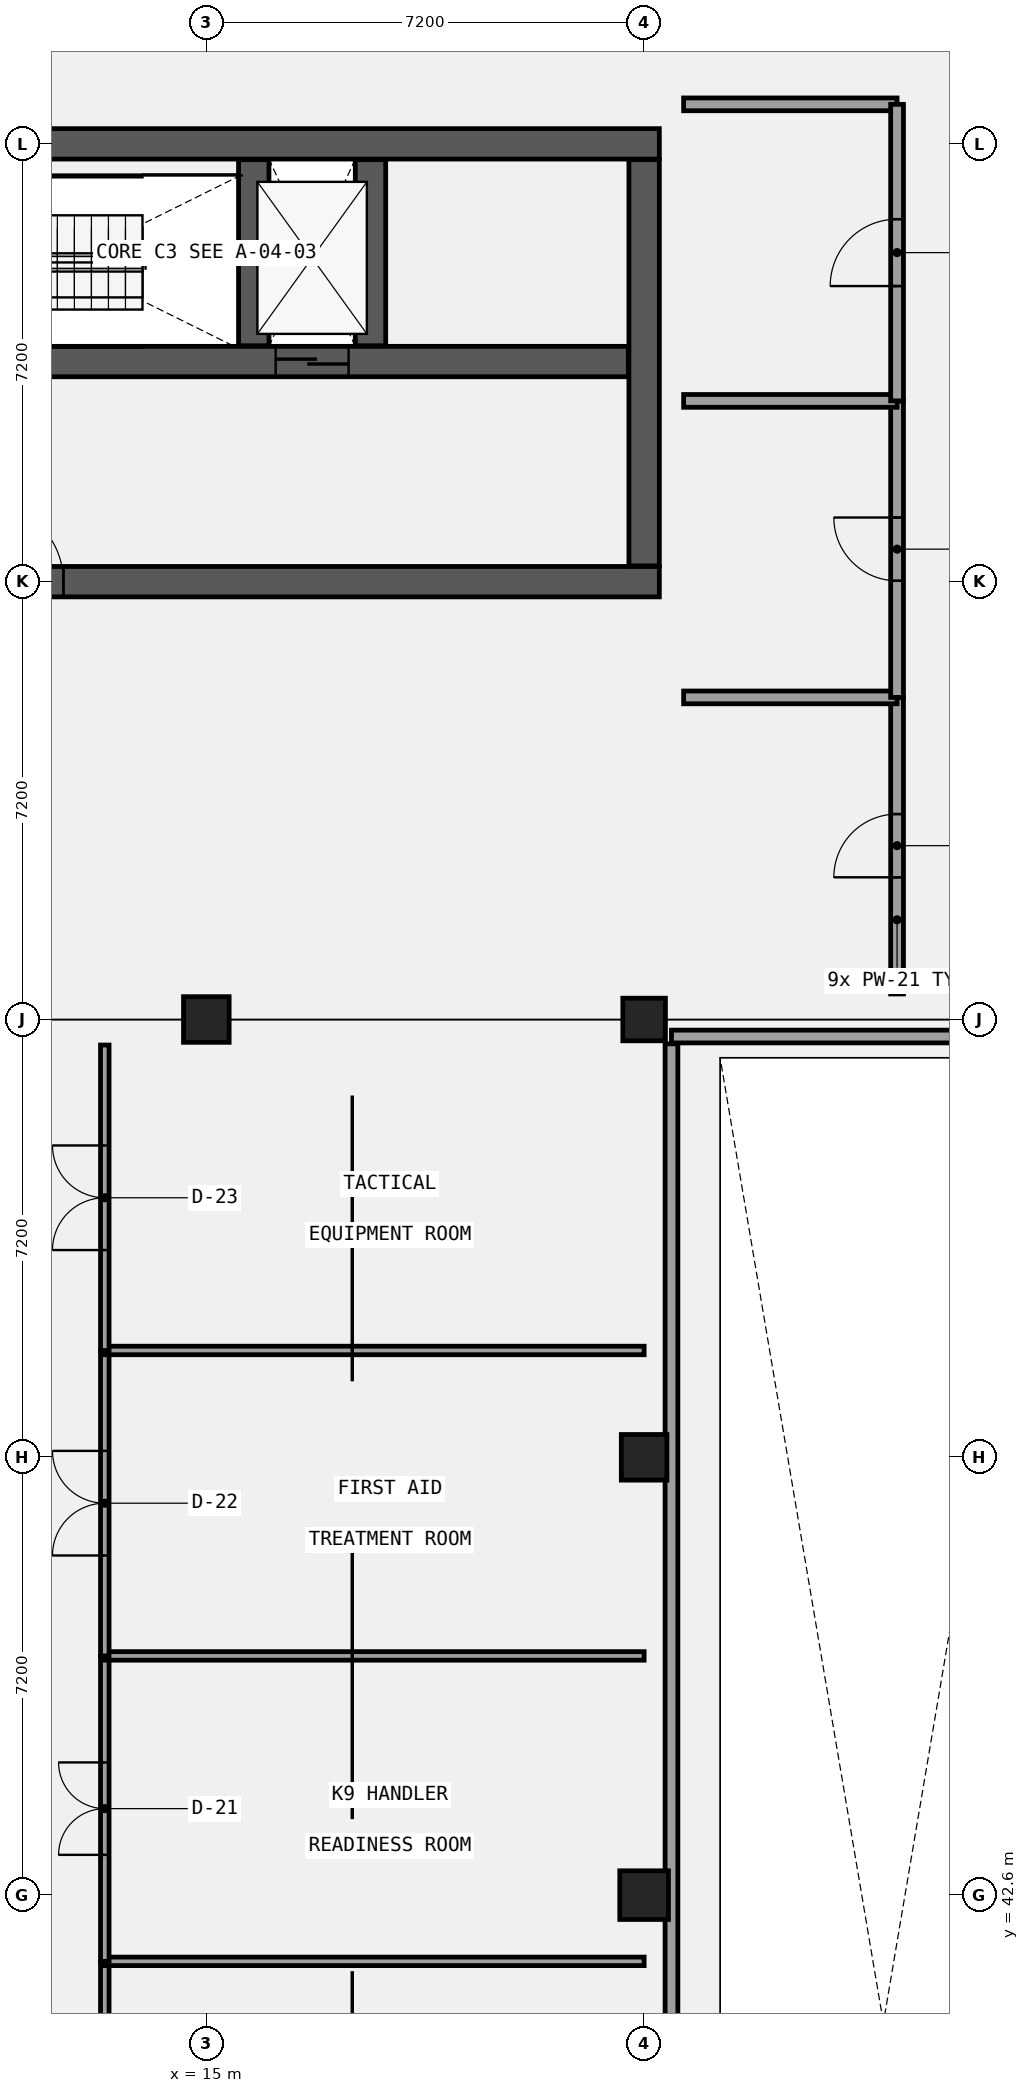
"""IFC4 building model, lengths in metres.
Left out: names, types, materials, properties, quantities, classifications, styles, units other than length and angle.
Written with IfcOpenShell. Run it as: python <this file> out.ifc"""

import sys

from ifc_helpers import new_model, si_unit, direction, frame, frame_2d, origin, origin_2d, place, context, subcontext, project, spatial, rectangle, extrude, element, fill, save


model = new_model("IFC4")
c1 = context("Model", 3, precision=1e-05, world=origin(), true_north=direction((0.0, 1.0)))
c2 = subcontext(c1, "Body", "Model", "MODEL_VIEW")
j1 = project(units=[si_unit("LENGTHUNIT", "METRE"), si_unit("PLANEANGLEUNIT", "RADIAN")], contexts=[c1])
p1 = place(None, origin())
s1 = spatial("IfcSite", under=j1, at=p1, CompositionType="ELEMENT")
p2 = place(p1, origin())
s2 = spatial("IfcBuilding", under=s1, at=p2, CompositionType="ELEMENT")
p3 = place(p2, origin())
s3 = spatial("IfcBuildingStorey", under=s2, at=p3, CompositionType="ELEMENT", Elevation=0.0)
p4 = place(p3, frame((7.55, 71.4, 0.0), z_axis=(0.0, 0.0, 1.0), x_axis=(1.0, 0.0, 0.0)))
e1 = element("IfcWall", 1, at=p4, inside=s3, PredefinedType="SHEAR", context=c2, shape_type="SweptSolid", body=[
    extrude(rectangle(XDim=14.9, YDim=0.5, at=frame_2d((7.45, 0.0))), origin(), (0.0, 0.0, 1.0), 5.4),
])
p5 = place(p3, frame((7.55, 64.2, 0.0), z_axis=(0.0, 0.0, 1.0), x_axis=(1.0, 0.0, 0.0)))
e2 = element("IfcWall", 2, at=p5, inside=s3, PredefinedType="SHEAR", context=c2, shape_type="SweptSolid", body=[
    extrude(rectangle(XDim=14.9, YDim=0.5, at=frame_2d((7.45, 0.0))), origin(), (0.0, 0.0, 1.0), 5.4),
])
p6 = place(p5, frame((3.8, 0.0, 0.0)))
e3 = element("IfcOpeningElement", 3, at=p6, cuts=e2, PredefinedType="OPENING", context=c2, shape_type="SweptSolid", body=[
    extrude(rectangle(XDim=1.3, YDim=2.2, at=frame_2d((0.65, 1.1))), frame((0.0, 0.26, 0.0), z_axis=(0.0, -1.0, 0.0), x_axis=(1.0, 0.0, 0.0)), (0.0, 0.0, 1.0), 0.52),
])
p7 = place(p3, frame((22.2, 64.46, 0.0), z_axis=(0.0, 0.0, 1.0), x_axis=(0.0, 1.0, 0.0)))
e4 = element("IfcWall", 4, at=p7, inside=s3, PredefinedType="SHEAR", context=c2, shape_type="SweptSolid", body=[
    extrude(rectangle(XDim=6.68, YDim=0.5, at=frame_2d((3.34, 0.0))), origin(), (0.0, 0.0, 1.0), 5.4),
])
p8 = place(p3, frame((8.06, 67.82, 0.0), z_axis=(0.0, 0.0, 1.0), x_axis=(1.0, 0.0, 0.0)))
e5 = element("IfcWall", 5, at=p8, inside=s3, PredefinedType="SHEAR", context=c2, shape_type="SweptSolid", body=[
    extrude(rectangle(XDim=13.88, YDim=0.5, at=frame_2d((6.94, 0.0))), origin(), (0.0, 0.0, 1.0), 5.4),
])
p9 = place(p8, frame((8.08, 0.0, 0.0)))
e6 = element("IfcOpeningElement", 6, at=p9, cuts=e5, PredefinedType="OPENING", context=c2, shape_type="SweptSolid", body=[
    extrude(rectangle(XDim=1.2, YDim=2.15, at=frame_2d((0.6, 1.075))), frame((0.0, 0.26, 0.0), z_axis=(0.0, -1.0, 0.0), x_axis=(1.0, 0.0, 0.0)), (0.0, 0.0, 1.0), 0.52),
])
p10 = place(p8, frame((0.315, 0.0, 0.0)))
e7 = element("IfcOpeningElement", 7, at=p10, cuts=e5, PredefinedType="OPENING", context=c2, shape_type="SweptSolid", body=[
    extrude(rectangle(XDim=1.15, YDim=2.15, at=frame_2d((0.575, 1.075))), frame((0.0, 0.26, 0.0), z_axis=(0.0, -1.0, 0.0), x_axis=(1.0, 0.0, 0.0)), (0.0, 0.0, 1.0), 0.52),
])
for number, where, z_axis, x_axis in (
    (8, (15.78, 68.08, 0.0), (0.0, 0.0, 1.0), (0.0, 1.0, 0.0)),
    (9, (17.7, 68.08, 0.0), (0.0, 0.0, 1.0), (0.0, 1.0, 0.0)),
):
    element("IfcWall", number, at=place(p3, frame(where, z_axis=z_axis, x_axis=x_axis)), inside=s3, PredefinedType="SHEAR", context=c2, shape_type="SweptSolid", body=[
        extrude(rectangle(XDim=3.06, YDim=0.5, at=frame_2d((1.53, 0.0))), origin(), (0.0, 0.0, 1.0), 5.4),
    ])
p11 = place(p3, frame((15.0, 57.0, 0.0), z_axis=(0.0, 0.0, 1.0), x_axis=(1.0, 0.0, 0.0)))
e10 = element("IfcColumn", 10, at=p11, inside=s3, PredefinedType="COLUMN", context=c2, shape_type="SweptSolid", body=[
    extrude(rectangle(XDim=0.75, YDim=0.75, at=origin_2d()), origin(), (0.0, 0.0, 1.0), 5.4),
])
p12 = place(p3, frame((22.2, 42.6, 0.0), z_axis=(0.0, 0.0, 1.0), x_axis=(1.0, 0.0, 0.0)))
e11 = element("IfcColumn", 11, at=p12, inside=s3, PredefinedType="COLUMN", context=c2, shape_type="SweptSolid", body=[
    extrude(rectangle(XDim=0.8, YDim=0.8, at=origin_2d()), origin(), (0.0, 0.0, 1.0), 5.4),
])
p13 = place(p3, frame((22.2, 49.8, 0.0), z_axis=(0.0, 0.0, 1.0), x_axis=(1.0, 0.0, 0.0)))
e12 = element("IfcColumn", 12, at=p13, inside=s3, PredefinedType="COLUMN", context=c2, shape_type="SweptSolid", body=[
    extrude(rectangle(XDim=0.75, YDim=0.75, at=origin_2d()), origin(), (0.0, 0.0, 1.0), 5.4),
])
p14 = place(p3, frame((22.2, 57.0, 0.0), z_axis=(0.0, 0.0, 1.0), x_axis=(1.0, 0.0, 0.0)))
e13 = element("IfcColumn", 13, at=p14, inside=s3, PredefinedType="COLUMN", context=c2, shape_type="SweptSolid", body=[
    extrude(rectangle(XDim=0.7, YDim=0.7, at=origin_2d()), origin(), (0.0, 0.0, 1.0), 5.4),
])
p15 = place(p3, frame((22.65, 24.6, 0.0), z_axis=(0.0, 0.0, 1.0), x_axis=(0.0, 1.0, 0.0)))
e14 = element("IfcWall", 14, at=p15, inside=s3, PredefinedType="PARTITIONING", context=c2, shape_type="SweptSolid", body=[
    extrude(rectangle(XDim=32.0, YDim=0.21, at=frame_2d((16.0, 0.0))), origin(), (0.0, 0.0, 1.0), 4.65),
])
p16 = place(p3, frame((22.65, 56.72, 0.0), z_axis=(0.0, 0.0, 1.0), x_axis=(1.0, 0.0, 0.0)))
e15 = element("IfcWall", 15, at=p16, inside=s3, PredefinedType="PARTITIONING", context=c2, shape_type="SweptSolid", body=[
    extrude(rectangle(XDim=6.2, YDim=0.21, at=frame_2d((3.1, 0.0))), origin(), (0.0, 0.0, 1.0), 4.42),
])
p17 = place(p3, frame((13.33, 36.489, 0.0), z_axis=(0.0, 0.0, 1.0), x_axis=(0.0, 1.0, 0.0)))
e16 = element("IfcWall", 16, at=p17, inside=s3, PredefinedType="PARTITIONING", context=c2, shape_type="SweptSolid", body=[
    extrude(rectangle(XDim=5.022, YDim=0.14, at=frame_2d((2.511, 0.0))), origin(), (0.0, 0.0, 1.0), 5.12),
])
p18 = place(p17, frame((1.751, 0.0, 0.0)))
e17 = element("IfcOpeningElement", 17, at=p18, cuts=e16, PredefinedType="OPENING", context=c2, shape_type="SweptSolid", body=[
    extrude(rectangle(XDim=1.52, YDim=2.22, at=frame_2d((0.76, 1.11))), frame((0.0, 0.08, 0.0), z_axis=(0.0, -1.0, 0.0), x_axis=(1.0, 0.0, 0.0)), (0.0, 0.0, 1.0), 0.16),
])
p19 = place(p3, frame((13.33, 41.511, 0.0), z_axis=(0.0, 0.0, 1.0), x_axis=(1.0, 0.0, 0.0)))
e18 = element("IfcWall", 18, at=p19, inside=s3, PredefinedType="PARTITIONING", context=c2, shape_type="SweptSolid", body=[
    extrude(rectangle(XDim=8.87, YDim=0.14, at=frame_2d((4.435, 0.0))), origin(), (0.0, 0.0, 1.0), 5.12),
])
p20 = place(p3, frame((13.33, 41.511, 0.0), z_axis=(0.0, 0.0, 1.0), x_axis=(0.0, 1.0, 0.0)))
e19 = element("IfcWall", 19, at=p20, inside=s3, PredefinedType="PARTITIONING", context=c2, shape_type="SweptSolid", body=[
    extrude(rectangle(XDim=5.023, YDim=0.14, at=frame_2d((2.511, 0.0))), origin(), (0.0, 0.0, 1.0), 5.12),
])
p21 = place(p20, frame((1.751, 0.0, 0.0)))
e20 = element("IfcOpeningElement", 20, at=p21, cuts=e19, PredefinedType="OPENING", context=c2, shape_type="SweptSolid", body=[
    extrude(rectangle(XDim=1.52, YDim=2.35, at=frame_2d((0.76, 1.175))), frame((0.0, 0.08, 0.0), z_axis=(0.0, -1.0, 0.0), x_axis=(1.0, 0.0, 0.0)), (0.0, 0.0, 1.0), 0.16),
])
p22 = place(p3, frame((13.33, 46.534, 0.0), z_axis=(0.0, 0.0, 1.0), x_axis=(1.0, 0.0, 0.0)))
e21 = element("IfcWall", 21, at=p22, inside=s3, PredefinedType="PARTITIONING", context=c2, shape_type="SweptSolid", body=[
    extrude(rectangle(XDim=8.87, YDim=0.14, at=frame_2d((4.435, 0.0))), origin(), (0.0, 0.0, 1.0), 5.12),
])
p23 = place(p3, frame((13.33, 46.534, 0.0), z_axis=(0.0, 0.0, 1.0), x_axis=(0.0, 1.0, 0.0)))
e22 = element("IfcWall", 22, at=p23, inside=s3, PredefinedType="PARTITIONING", context=c2, shape_type="SweptSolid", body=[
    extrude(rectangle(XDim=5.023, YDim=0.14, at=frame_2d((2.511, 0.0))), origin(), (0.0, 0.0, 1.0), 5.12),
])
p24 = place(p23, frame((1.652, 0.0, 0.0)))
e23 = element("IfcOpeningElement", 23, at=p24, cuts=e22, PredefinedType="OPENING", context=c2, shape_type="SweptSolid", body=[
    extrude(rectangle(XDim=1.72, YDim=2.1, at=frame_2d((0.86, 1.05))), frame((0.0, 0.08, 0.0), z_axis=(0.0, -1.0, 0.0), x_axis=(1.0, 0.0, 0.0)), (0.0, 0.0, 1.0), 0.16),
])
p25 = place(p3, frame((13.33, 51.557, 0.0), z_axis=(0.0, 0.0, 1.0), x_axis=(1.0, 0.0, 0.0)))
e24 = element("IfcWall", 24, at=p25, inside=s3, PredefinedType="PARTITIONING", context=c2, shape_type="SweptSolid", body=[
    extrude(rectangle(XDim=8.87, YDim=0.14, at=frame_2d((4.435, 0.0))), origin(), (0.0, 0.0, 1.0), 5.12),
])
p26 = place(p3, frame((13.33, 51.557, 0.0), z_axis=(0.0, 0.0, 1.0), x_axis=(0.0, 1.0, 0.0)))
e25 = element("IfcWall", 25, at=p26, inside=s3, PredefinedType="PARTITIONING", context=c2, shape_type="SweptSolid", body=[
    extrude(rectangle(XDim=5.023, YDim=0.14, at=frame_2d((2.512, 0.0))), origin(), (0.0, 0.0, 1.0), 5.12),
])
p27 = place(p26, frame((1.652, 0.0, 0.0)))
e26 = element("IfcOpeningElement", 26, at=p27, cuts=e25, PredefinedType="OPENING", context=c2, shape_type="SweptSolid", body=[
    extrude(rectangle(XDim=1.72, YDim=2.22, at=frame_2d((0.86, 1.11))), frame((0.0, 0.08, 0.0), z_axis=(0.0, -1.0, 0.0), x_axis=(1.0, 0.0, 0.0)), (0.0, 0.0, 1.0), 0.16),
])
p28 = place(p3, frame((22.85, 72.05, 0.0), z_axis=(0.0, 0.0, 1.0), x_axis=(1.0, 0.0, 0.0)))
e27 = element("IfcWall", 27, at=p28, inside=s3, PredefinedType="PARTITIONING", context=c2, shape_type="SweptSolid", body=[
    extrude(rectangle(XDim=3.51, YDim=0.21, at=frame_2d((1.755, 0.0))), origin(), (0.0, 0.0, 1.0), 5.12),
])
p29 = place(p3, frame((26.36, 57.42, 0.0), z_axis=(0.0, 0.0, 1.0), x_axis=(0.0, 1.0, 0.0)))
e28 = element("IfcWall", 28, at=p29, inside=s3, PredefinedType="PARTITIONING", context=c2, shape_type="SweptSolid", body=[
    extrude(rectangle(XDim=4.877, YDim=0.21, at=frame_2d((2.438, 0.0))), origin(), (0.0, 0.0, 1.0), 5.12),
])
p30 = place(p29, frame((1.918, 0.0, 0.0)))
e29 = element("IfcOpeningElement", 29, at=p30, cuts=e28, PredefinedType="OPENING", context=c2, shape_type="SweptSolid", body=[
    extrude(rectangle(XDim=1.04, YDim=2.22, at=frame_2d((0.52, 1.11))), frame((0.0, 0.115, 0.0), z_axis=(0.0, -1.0, 0.0), x_axis=(1.0, 0.0, 0.0)), (0.0, 0.0, 1.0), 0.23),
])
p31 = place(p3, frame((22.85, 62.297, 0.0), z_axis=(0.0, 0.0, 1.0), x_axis=(1.0, 0.0, 0.0)))
e30 = element("IfcWall", 30, at=p31, inside=s3, PredefinedType="PARTITIONING", context=c2, shape_type="SweptSolid", body=[
    extrude(rectangle(XDim=3.51, YDim=0.21, at=frame_2d((1.755, 0.0))), origin(), (0.0, 0.0, 1.0), 4.57),
])
p32 = place(p3, frame((26.36, 62.297, 0.0), z_axis=(0.0, 0.0, 1.0), x_axis=(0.0, 1.0, 0.0)))
e31 = element("IfcWall", 31, at=p32, inside=s3, PredefinedType="PARTITIONING", context=c2, shape_type="SweptSolid", body=[
    extrude(rectangle(XDim=4.876, YDim=0.21, at=frame_2d((2.438, 0.0))), origin(), (0.0, 0.0, 1.0), 5.12),
])
p33 = place(p32, frame((1.918, 0.0, 0.0)))
e32 = element("IfcOpeningElement", 32, at=p33, cuts=e31, PredefinedType="OPENING", context=c2, shape_type="SweptSolid", body=[
    extrude(rectangle(XDim=1.04, YDim=2.35, at=frame_2d((0.52, 1.175))), frame((0.0, 0.115, 0.0), z_axis=(0.0, -1.0, 0.0), x_axis=(1.0, 0.0, 0.0)), (0.0, 0.0, 1.0), 0.23),
])
p34 = place(p3, frame((22.85, 67.173, 0.0), z_axis=(0.0, 0.0, 1.0), x_axis=(1.0, 0.0, 0.0)))
e33 = element("IfcWall", 33, at=p34, inside=s3, PredefinedType="PARTITIONING", context=c2, shape_type="SweptSolid", body=[
    extrude(rectangle(XDim=3.51, YDim=0.21, at=frame_2d((1.755, 0.0))), origin(), (0.0, 0.0, 1.0), 5.12),
])
p35 = place(p3, frame((26.36, 67.173, 0.0), z_axis=(0.0, 0.0, 1.0), x_axis=(0.0, 1.0, 0.0)))
e34 = element("IfcWall", 34, at=p35, inside=s3, PredefinedType="PARTITIONING", context=c2, shape_type="SweptSolid", body=[
    extrude(rectangle(XDim=4.877, YDim=0.21, at=frame_2d((2.438, 0.0))), origin(), (0.0, 0.0, 1.0), 5.12),
])
p36 = place(p35, frame((1.888, 0.0, 0.0)))
e35 = element("IfcOpeningElement", 35, at=p36, cuts=e34, PredefinedType="OPENING", context=c2, shape_type="SweptSolid", body=[
    extrude(rectangle(XDim=1.1, YDim=2.1, at=frame_2d((0.55, 1.05))), frame((0.0, 0.115, 0.0), z_axis=(0.0, -1.0, 0.0), x_axis=(1.0, 0.0, 0.0)), (0.0, 0.0, 1.0), 0.23),
])
p37 = place(p9, frame((1.2, 0.0, 0.0), z_axis=(0.0, 0.0, 1.0), x_axis=(-1.0, 0.0, 0.0)))
e36 = element("IfcDoor", 36, at=p37, inside=s3, OperationType="DOUBLE_DOOR_SLIDING", PredefinedType="DOOR", context=c2, shape_type="SweptSolid", body=[
    extrude(rectangle(XDim=1.2, YDim=2.15, at=frame_2d((0.6, 1.075))), frame((0.0, 0.025, 0.0), z_axis=(0.0, -1.0, 0.0), x_axis=(1.0, 0.0, 0.0)), (0.0, 0.0, 1.0), 0.05),
])
fill(e6, e36)
p38 = place(p6, frame((1.3, 0.0, 0.0), z_axis=(0.0, 0.0, 1.0), x_axis=(-1.0, 0.0, 0.0)))
e37 = element("IfcDoor", 37, at=p38, inside=s3, OperationType="SINGLE_SWING_LEFT", PredefinedType="DOOR", context=c2, shape_type="SweptSolid", body=[
    extrude(rectangle(XDim=1.3, YDim=2.2, at=frame_2d((0.65, 1.1))), frame((0.0, 0.025, 0.0), z_axis=(0.0, -1.0, 0.0), x_axis=(1.0, 0.0, 0.0)), (0.0, 0.0, 1.0), 0.05),
])
fill(e3, e37)
p39 = place(p21, origin())
e38 = element("IfcDoor", 38, at=p39, inside=s3, OperationType="DOUBLE_DOOR_SINGLE_SWING", PredefinedType="DOOR", context=c2, shape_type="SweptSolid", body=[
    extrude(rectangle(XDim=1.52, YDim=2.35, at=frame_2d((0.76, 1.175))), frame((0.0, 0.025, 0.0), z_axis=(0.0, -1.0, 0.0), x_axis=(1.0, 0.0, 0.0)), (0.0, 0.0, 1.0), 0.05),
])
fill(e20, e38)
p40 = place(p24, origin())
e39 = element("IfcDoor", 39, at=p40, inside=s3, OperationType="DOUBLE_DOOR_SINGLE_SWING", PredefinedType="DOOR", context=c2, shape_type="SweptSolid", body=[
    extrude(rectangle(XDim=1.72, YDim=2.1, at=frame_2d((0.86, 1.05))), frame((0.0, 0.025, 0.0), z_axis=(0.0, -1.0, 0.0), x_axis=(1.0, 0.0, 0.0)), (0.0, 0.0, 1.0), 0.05),
])
fill(e23, e39)
p41 = place(p27, origin())
e40 = element("IfcDoor", 40, at=p41, inside=s3, OperationType="DOUBLE_DOOR_SINGLE_SWING", PredefinedType="DOOR", context=c2, shape_type="SweptSolid", body=[
    extrude(rectangle(XDim=1.72, YDim=2.22, at=frame_2d((0.86, 1.11))), frame((0.0, 0.025, 0.0), z_axis=(0.0, -1.0, 0.0), x_axis=(1.0, 0.0, 0.0)), (0.0, 0.0, 1.0), 0.05),
])
fill(e26, e40)
p42 = place(p30, frame((1.04, 0.0, 0.0), z_axis=(0.0, 0.0, 1.0), x_axis=(-1.0, 0.0, 0.0)))
e41 = element("IfcDoor", 41, at=p42, inside=s3, OperationType="SINGLE_SWING_LEFT", PredefinedType="DOOR", context=c2, shape_type="SweptSolid", body=[
    extrude(rectangle(XDim=1.04, YDim=2.22, at=frame_2d((0.52, 1.11))), frame((0.0, 0.025, 0.0), z_axis=(0.0, -1.0, 0.0), x_axis=(1.0, 0.0, 0.0)), (0.0, 0.0, 1.0), 0.05),
])
fill(e29, e41)
p43 = place(p33, frame((1.04, 0.0, 0.0), z_axis=(0.0, 0.0, 1.0), x_axis=(-1.0, 0.0, 0.0)))
e42 = element("IfcDoor", 42, at=p43, inside=s3, OperationType="SINGLE_SWING_RIGHT", PredefinedType="DOOR", context=c2, shape_type="SweptSolid", body=[
    extrude(rectangle(XDim=1.04, YDim=2.35, at=frame_2d((0.52, 1.175))), frame((0.0, 0.025, 0.0), z_axis=(0.0, -1.0, 0.0), x_axis=(1.0, 0.0, 0.0)), (0.0, 0.0, 1.0), 0.05),
])
fill(e32, e42)
p44 = place(p36, frame((1.1, 0.0, 0.0), z_axis=(0.0, 0.0, 1.0), x_axis=(-1.0, 0.0, 0.0)))
e43 = element("IfcDoor", 43, at=p44, inside=s3, OperationType="SINGLE_SWING_LEFT", PredefinedType="DOOR", context=c2, shape_type="SweptSolid", body=[
    extrude(rectangle(XDim=1.1, YDim=2.1, at=frame_2d((0.55, 1.05))), frame((0.0, 0.025, 0.0), z_axis=(0.0, -1.0, 0.0), x_axis=(1.0, 0.0, 0.0)), (0.0, 0.0, 1.0), 0.05),
])
fill(e35, e43)
save(model, sys.argv[1])
